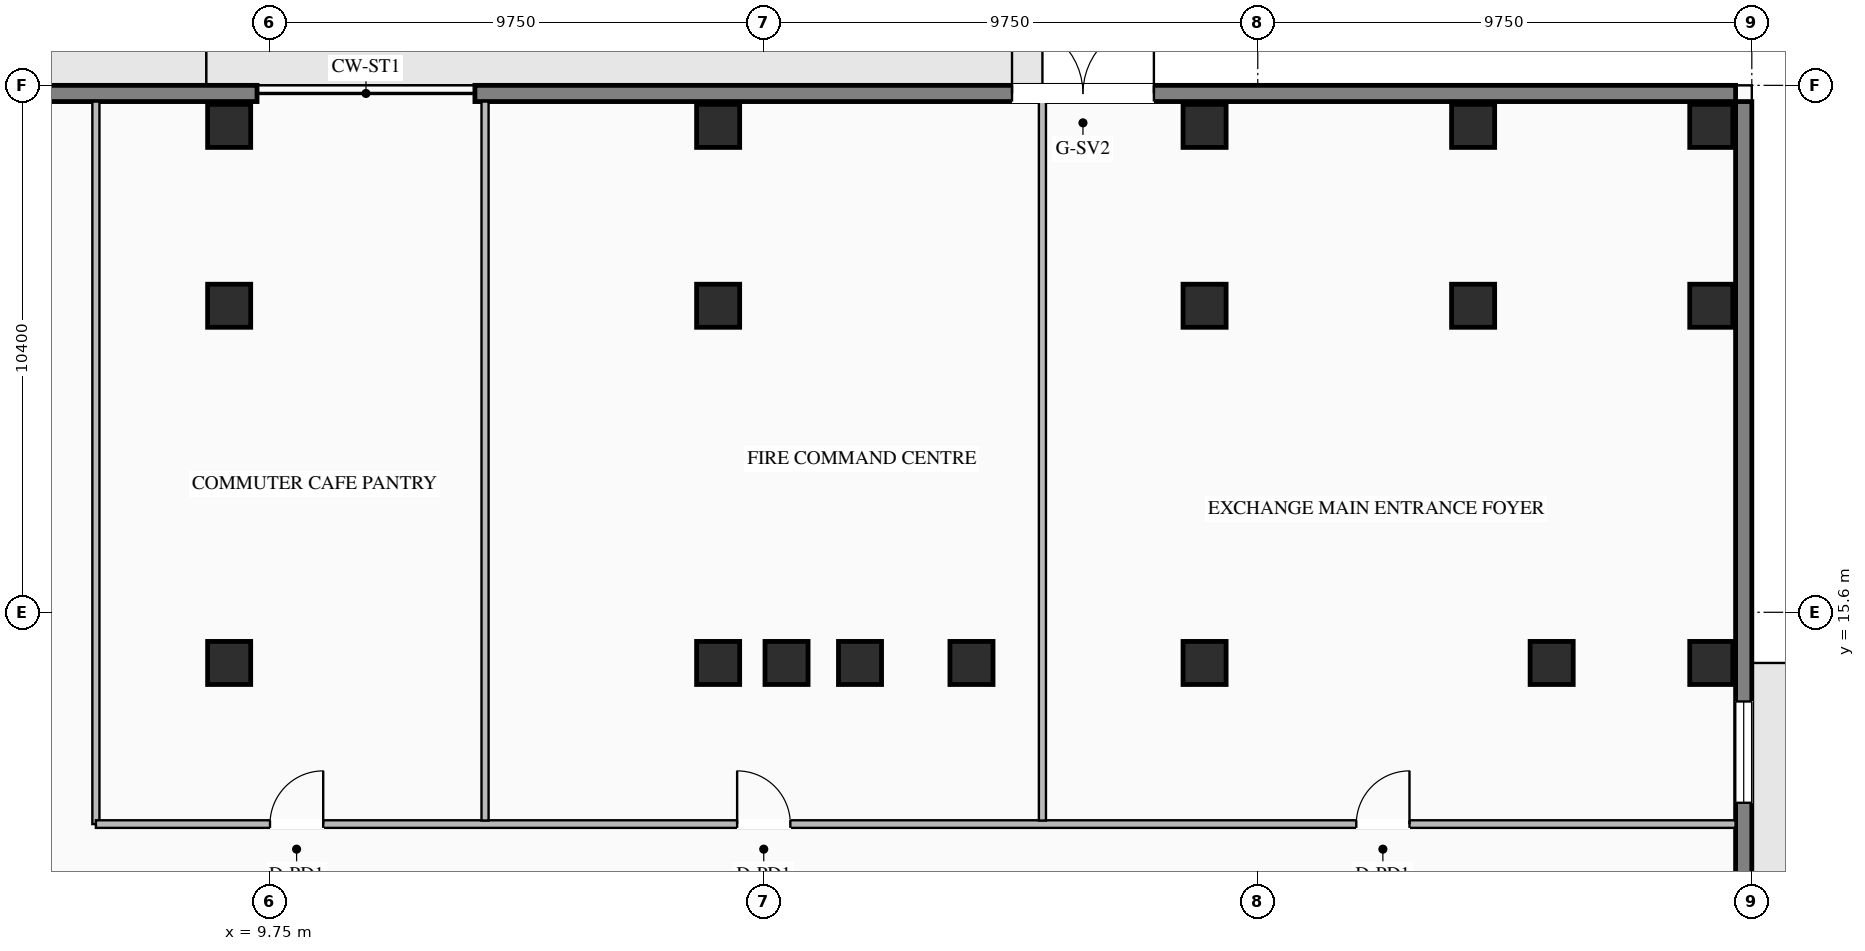
"""IFC4 building model, lengths in metres.
Left out: names, types, materials, properties, quantities, classifications, styles, units other than length and angle.
Written with IfcOpenShell. Run it as: python <this file> out.ifc"""

import sys

from ifc_helpers import new_model, si_unit, direction, frame, frame_2d, origin, origin_2d, place, context, subcontext, project, spatial, rectangle, i_section, extrude, element, fill, save


model = new_model("IFC4")
c1 = context("Model", 3, precision=1e-05, world=origin(), true_north=direction((0.0, 1.0)))
c2 = subcontext(c1, "Body", "Model", "MODEL_VIEW")
j1 = project(units=[si_unit("LENGTHUNIT", "METRE"), si_unit("PLANEANGLEUNIT", "RADIAN")], contexts=[c1])
p1 = place(None, origin())
s1 = spatial("IfcSite", under=j1, at=p1, CompositionType="ELEMENT")
p2 = place(p1, origin())
s2 = spatial("IfcBuilding", under=s1, at=p2, CompositionType="ELEMENT")
p3 = place(p2, origin())
s3 = spatial("IfcBuildingStorey", under=s2, at=p3, CompositionType="ELEMENT", Elevation=0.0)
for number, where, z_axis, x_axis in (
    (1, (8.95, 14.6, 0.0), (0.0, 0.0, 1.0), (1.0, 0.0, 0.0)),
    (2, (18.6, 14.6, 0.0), (0.0, 0.0, 1.0), (1.0, 0.0, 0.0)),
    (3, (19.95, 14.6, 0.0), (0.0, 0.0, 1.0), (1.0, 0.0, 0.0)),
    (4, (21.4, 14.6, 0.0), (0.0, 0.0, 1.0), (1.0, 0.0, 0.0)),
    (5, (23.6, 14.6, 0.0), (0.0, 0.0, 1.0), (1.0, 0.0, 0.0)),
    (6, (28.2, 14.6, 0.0), (0.0, 0.0, 1.0), (1.0, 0.0, 0.0)),
    (7, (35.05, 14.6, 0.0), (0.0, 0.0, 1.0), (1.0, 0.0, 0.0)),
    (8, (8.95, 21.65, 0.0), (0.0, 0.0, 1.0), (1.0, 0.0, 0.0)),
    (9, (18.6, 21.65, 0.0), (0.0, 0.0, 1.0), (1.0, 0.0, 0.0)),
    (10, (28.2, 21.65, 0.0), (0.0, 0.0, 1.0), (1.0, 0.0, 0.0)),
    (11, (33.5, 21.65, 0.0), (0.0, 0.0, 1.0), (1.0, 0.0, 0.0)),
    (12, (38.2, 21.65, 0.0), (0.0, 0.0, 1.0), (1.0, 0.0, 0.0)),
    (13, (8.95, 25.2, 0.0), (0.0, 0.0, 1.0), (1.0, 0.0, 0.0)),
    (14, (18.6, 25.2, 0.0), (0.0, 0.0, 1.0), (1.0, 0.0, 0.0)),
    (15, (28.2, 25.2, 0.0), (0.0, 0.0, 1.0), (1.0, 0.0, 0.0)),
    (16, (33.5, 25.2, 0.0), (0.0, 0.0, 1.0), (1.0, 0.0, 0.0)),
    (17, (38.2, 25.2, 0.0), (0.0, 0.0, 1.0), (1.0, 0.0, 0.0)),
    (18, (38.2, 14.6, 0.0), (0.0, 0.0, 1.0), (1.0, 0.0, 0.0)),
):
    element("IfcColumn", number, at=place(p3, frame(where, z_axis=z_axis, x_axis=x_axis)), inside=s3, PredefinedType="COLUMN", context=c2, shape_type="SweptSolid", body=[
        extrude(i_section(OverallWidth=0.85, OverallDepth=0.85, WebThickness=0.032, FlangeThickness=0.048, at=origin_2d()), origin(), (0.0, 0.0, 1.0), 5.1),
    ])
p4 = place(p3, frame((-9.5, 25.84, 0.0), z_axis=(0.0, 0.0, 1.0), x_axis=(1.0, 0.0, 0.0)))
e19 = element("IfcWall", 19, at=p4, inside=s3, PredefinedType="STANDARD", context=c2, shape_type="SweptSolid", body=[
    extrude(rectangle(XDim=19.0, YDim=0.32, at=frame_2d((9.5, 0.0))), origin(), (0.0, 0.0, 1.0), 4.83),
])
p5 = place(p4, frame((5.0, 0.0, 0.0)))
e20 = element("IfcOpeningElement", 20, at=p5, cuts=e19, PredefinedType="OPENING", context=c2, shape_type="SweptSolid", body=[
    extrude(rectangle(XDim=2.4, YDim=2.4, at=frame_2d((1.2, 1.2))), frame((0.0, 0.17, 0.0), z_axis=(0.0, -1.0, 0.0), x_axis=(1.0, 0.0, 0.0)), (0.0, 0.0, 1.0), 0.34),
])
p6 = place(p4, frame((8.5, 0.0, 0.0)))
e21 = element("IfcOpeningElement", 21, at=p6, cuts=e19, PredefinedType="OPENING", context=c2, shape_type="SweptSolid", body=[
    extrude(rectangle(XDim=2.0, YDim=2.3, at=frame_2d((1.0, 1.15))), frame((0.0, 0.17, 0.0), z_axis=(0.0, -1.0, 0.0), x_axis=(1.0, 0.0, 0.0)), (0.0, 0.0, 1.0), 0.34),
])
p7 = place(p4, frame((11.6, 0.0, 0.0)))
e22 = element("IfcOpeningElement", 22, at=p7, cuts=e19, PredefinedType="OPENING", context=c2, shape_type="SweptSolid", body=[
    extrude(rectangle(XDim=2.4, YDim=2.4, at=frame_2d((1.2, 1.2))), frame((0.0, 0.17, 0.0), z_axis=(0.0, -1.0, 0.0), x_axis=(1.0, 0.0, 0.0)), (0.0, 0.0, 1.0), 0.34),
])
p8 = place(p3, frame((13.8, 25.84, 0.0), z_axis=(0.0, 0.0, 1.0), x_axis=(1.0, 0.0, 0.0)))
e23 = element("IfcWall", 23, at=p8, inside=s3, PredefinedType="STANDARD", context=c2, shape_type="SweptSolid", body=[
    extrude(rectangle(XDim=24.88, YDim=0.32, at=frame_2d((12.44, 0.0))), origin(), (0.0, 0.0, 1.0), 4.83),
])
p9 = place(p8, frame((10.6, 0.0, 0.0)))
e24 = element("IfcOpeningElement", 24, at=p9, cuts=e23, PredefinedType="OPENING", context=c2, shape_type="SweptSolid", body=[
    extrude(rectangle(XDim=2.8, YDim=2.5, at=frame_2d((1.4, 1.25))), frame((0.0, 0.17, 0.0), z_axis=(0.0, -1.0, 0.0), x_axis=(1.0, 0.0, 0.0)), (0.0, 0.0, 1.0), 0.34),
])
p10 = place(p3, frame((38.84, 25.68, 0.0), z_axis=(0.0, 0.0, 1.0), x_axis=(0.0, -1.0, 0.0)))
e25 = element("IfcWall", 25, at=p10, inside=s3, PredefinedType="STANDARD", context=c2, shape_type="SweptSolid", body=[
    extrude(rectangle(XDim=51.36, YDim=0.32, at=frame_2d((25.68, 0.0))), origin(), (0.0, 0.0, 1.0), 4.83),
])
p11 = place(p10, frame((11.84, 0.0, 0.8)))
e26 = element("IfcOpeningElement", 26, at=p11, cuts=e25, PredefinedType="OPENING", context=c2, shape_type="SweptSolid", body=[
    extrude(rectangle(XDim=2.0, YDim=2.2, at=frame_2d((1.0, 1.1))), frame((0.0, 0.17, 0.0), z_axis=(0.0, -1.0, 0.0), x_axis=(1.0, 0.0, 0.0)), (0.0, 0.0, 1.0), 0.34),
])
p12 = place(p10, frame((24.68, 0.0, 0.8)))
e27 = element("IfcOpeningElement", 27, at=p12, cuts=e25, PredefinedType="OPENING", context=c2, shape_type="SweptSolid", body=[
    extrude(rectangle(XDim=2.0, YDim=2.2, at=frame_2d((1.0, 1.1))), frame((0.0, 0.17, 0.0), z_axis=(0.0, -1.0, 0.0), x_axis=(1.0, 0.0, 0.0)), (0.0, 0.0, 1.0), 0.34),
])
p13 = place(p10, frame((37.52, 0.0, 0.8)))
e28 = element("IfcOpeningElement", 28, at=p13, cuts=e25, PredefinedType="OPENING", context=c2, shape_type="SweptSolid", body=[
    extrude(rectangle(XDim=2.0, YDim=2.2, at=frame_2d((1.0, 1.1))), frame((0.0, 0.17, 0.0), z_axis=(0.0, -1.0, 0.0), x_axis=(1.0, 0.0, 0.0)), (0.0, 0.0, 1.0), 0.34),
])
p14 = place(p3, frame((6.32, 11.42, 0.0), z_axis=(0.0, 0.0, 1.0), x_axis=(0.0, 1.0, 0.0)))
e29 = element("IfcWall", 29, at=p14, inside=s3, PredefinedType="STANDARD", context=c2, shape_type="SweptSolid", body=[
    extrude(rectangle(XDim=14.26, YDim=0.14, at=frame_2d((7.13, 0.0))), origin(), (0.0, 0.0, 1.0), 4.83),
])
p15 = place(p3, frame((6.32, 11.42, 0.0), z_axis=(0.0, 0.0, 1.0), x_axis=(1.0, 0.0, 0.0)))
e30 = element("IfcWall", 30, at=p15, inside=s3, PredefinedType="STANDARD", context=c2, shape_type="SweptSolid", body=[
    extrude(rectangle(XDim=32.36, YDim=0.15, at=frame_2d((16.18, 0.0))), origin(), (0.0, 0.0, 1.0), 4.83),
])
p16 = place(p15, frame((3.436, 0.0, 0.0)))
e31 = element("IfcOpeningElement", 31, at=p16, cuts=e30, PredefinedType="OPENING", context=c2, shape_type="SweptSolid", body=[
    extrude(rectangle(XDim=1.05, YDim=2.08, at=frame_2d((0.525, 1.04))), frame((0.0, 0.085, 0.0), z_axis=(0.0, -1.0, 0.0), x_axis=(1.0, 0.0, 0.0)), (0.0, 0.0, 1.0), 0.17),
])
p17 = place(p15, frame((12.655, 0.0, 0.0)))
e32 = element("IfcOpeningElement", 32, at=p17, cuts=e30, PredefinedType="OPENING", context=c2, shape_type="SweptSolid", body=[
    extrude(rectangle(XDim=1.05, YDim=2.08, at=frame_2d((0.525, 1.04))), frame((0.0, 0.085, 0.0), z_axis=(0.0, -1.0, 0.0), x_axis=(1.0, 0.0, 0.0)), (0.0, 0.0, 1.0), 0.17),
])
p18 = place(p15, frame((24.874, 0.0, 0.0)))
e33 = element("IfcOpeningElement", 33, at=p18, cuts=e30, PredefinedType="OPENING", context=c2, shape_type="SweptSolid", body=[
    extrude(rectangle(XDim=1.05, YDim=2.08, at=frame_2d((0.525, 1.04))), frame((0.0, 0.085, 0.0), z_axis=(0.0, -1.0, 0.0), x_axis=(1.0, 0.0, 0.0)), (0.0, 0.0, 1.0), 0.17),
])
for number, where, z_axis, x_axis in (
    (34, (14.0, 11.49, 0.0), (0.0, 0.0, 1.0), (0.0, 1.0, 0.0)),
    (35, (25.0, 11.49, 0.0), (0.0, 0.0, 1.0), (0.0, 1.0, 0.0)),
):
    element("IfcWall", number, at=place(p3, frame(where, z_axis=z_axis, x_axis=x_axis)), inside=s3, PredefinedType="STANDARD", context=c2, shape_type="SweptSolid", body=[
        extrude(rectangle(XDim=14.19, YDim=0.14, at=frame_2d((7.095, 0.0))), origin(), (0.0, 0.0, 1.0), 4.83),
    ])
p19 = place(p9, origin())
e36 = element("IfcDoor", 36, at=p19, inside=s3, OperationType="DOUBLE_DOOR_SINGLE_SWING", PredefinedType="GATE", context=c2, shape_type="SweptSolid", body=[
    extrude(rectangle(XDim=2.8, YDim=2.5, at=frame_2d((1.4, 1.25))), frame((0.0, 0.025, 0.0), z_axis=(0.0, -1.0, 0.0), x_axis=(1.0, 0.0, 0.0)), (0.0, 0.0, 1.0), 0.05),
])
fill(e24, e36)
p20 = place(p11, origin())
e37 = element("IfcWindow", 37, at=p20, inside=s3, PartitioningType="DOUBLE_PANEL_VERTICAL", PredefinedType="WINDOW", context=c2, shape_type="SweptSolid", body=[
    extrude(rectangle(XDim=2.0, YDim=2.2, at=frame_2d((1.0, 1.1))), frame((0.0, 0.03, 0.0), z_axis=(0.0, -1.0, 0.0), x_axis=(1.0, 0.0, 0.0)), (0.0, 0.0, 1.0), 0.06),
])
fill(e26, e37)
p21 = place(p16, origin())
e38 = element("IfcDoor", 38, at=p21, inside=s3, OperationType="SINGLE_SWING_RIGHT", PredefinedType="DOOR", context=c2, shape_type="SweptSolid", body=[
    extrude(rectangle(XDim=1.05, YDim=2.08, at=frame_2d((0.525, 1.04))), frame((0.0, 0.025, 0.0), z_axis=(0.0, -1.0, 0.0), x_axis=(1.0, 0.0, 0.0)), (0.0, 0.0, 1.0), 0.05),
])
fill(e31, e38)
p22 = place(p17, origin())
e39 = element("IfcDoor", 39, at=p22, inside=s3, OperationType="SINGLE_SWING_LEFT", PredefinedType="DOOR", context=c2, shape_type="SweptSolid", body=[
    extrude(rectangle(XDim=1.05, YDim=2.08, at=frame_2d((0.525, 1.04))), frame((0.0, 0.025, 0.0), z_axis=(0.0, -1.0, 0.0), x_axis=(1.0, 0.0, 0.0)), (0.0, 0.0, 1.0), 0.05),
])
fill(e32, e39)
p23 = place(p18, origin())
e40 = element("IfcDoor", 40, at=p23, inside=s3, OperationType="SINGLE_SWING_RIGHT", PredefinedType="DOOR", context=c2, shape_type="SweptSolid", body=[
    extrude(rectangle(XDim=1.05, YDim=2.08, at=frame_2d((0.525, 1.04))), frame((0.0, 0.025, 0.0), z_axis=(0.0, -1.0, 0.0), x_axis=(1.0, 0.0, 0.0)), (0.0, 0.0, 1.0), 0.05),
])
fill(e33, e40)
save(model, sys.argv[1])
